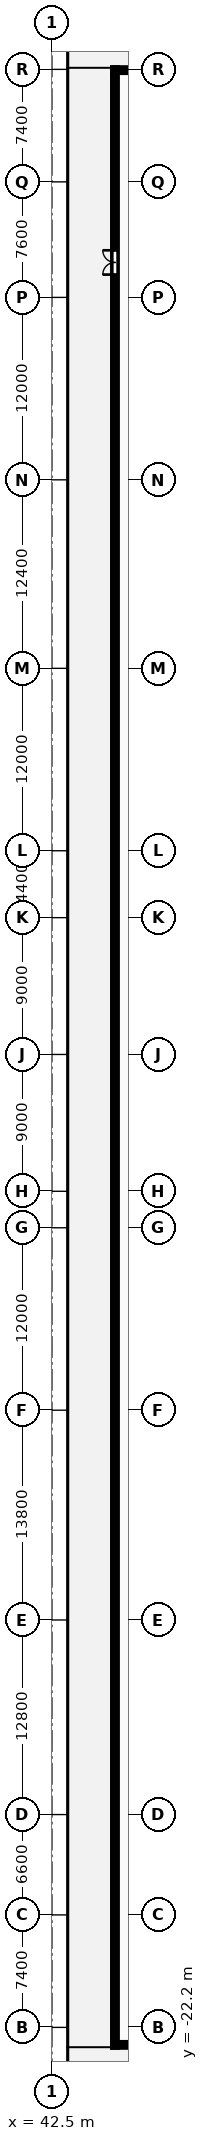
"""IFC4 building model, lengths in metres.
Left out: names, types, materials, properties, quantities, classifications, styles, units other than length and angle.
Written with IfcOpenShell. Run it as: python <this file> out.ifc"""

import sys

from ifc_helpers import new_model, si_unit, direction, frame, frame_2d, origin, place, context, subcontext, project, spatial, rectangle, extrude, element, fill, save


model = new_model("IFC4")
c1 = context("Model", 3, precision=1e-05, world=origin(), true_north=direction((0.0, 1.0)))
c2 = subcontext(c1, "Body", "Model", "MODEL_VIEW")
j1 = project(units=[si_unit("LENGTHUNIT", "METRE"), si_unit("PLANEANGLEUNIT", "RADIAN")], contexts=[c1])
p1 = place(None, origin())
s1 = spatial("IfcSite", under=j1, at=p1, CompositionType="ELEMENT")
p2 = place(p1, origin())
s2 = spatial("IfcBuilding", under=s1, at=p2, CompositionType="ELEMENT")
p3 = place(p2, frame((0.0, 0.0, 5.4)))
s3 = spatial("IfcBuildingStorey", under=s2, at=p3, CompositionType="ELEMENT", Elevation=5.4)
p4 = place(p3, frame((46.5, -23.35, 0.0), z_axis=(0.0, 0.0, 1.0), x_axis=(1.0, 0.0, 0.0)))
e1 = element("IfcWall", 1, at=p4, inside=s3, PredefinedType="STANDARD", context=c2, shape_type="SweptSolid", body=[
    extrude(rectangle(XDim=41.5, YDim=0.3, at=frame_2d((20.75, 0.0))), origin(), (0.0, 0.0, 1.0), 4.3),
])
p5 = place(p4, frame((14.0, 0.0, 0.0)))
e2 = element("IfcOpeningElement", 2, at=p5, cuts=e1, PredefinedType="OPENING", context=c2, shape_type="SweptSolid", body=[
    extrude(rectangle(XDim=1.6, YDim=2.2, at=frame_2d((0.8, 1.1))), frame((0.0, 0.16, 0.0), z_axis=(0.0, -1.0, 0.0), x_axis=(1.0, 0.0, 0.0)), (0.0, 0.0, 1.0), 0.32),
])
p6 = place(p4, frame((24.0, 0.0, 0.9)))
e3 = element("IfcOpeningElement", 3, at=p6, cuts=e1, PredefinedType="OPENING", context=c2, shape_type="SweptSolid", body=[
    extrude(rectangle(XDim=3.0, YDim=2.6, at=frame_2d((1.5, 1.3))), frame((0.0, 0.16, 0.0), z_axis=(0.0, -1.0, 0.0), x_axis=(1.0, 0.0, 0.0)), (0.0, 0.0, 1.0), 0.32),
])
p7 = place(p3, frame((86.0, 106.55, 0.0), z_axis=(0.0, 0.0, 1.0), x_axis=(-1.0, 0.0, 0.0)))
e4 = element("IfcWall", 4, at=p7, inside=s3, PredefinedType="STANDARD", context=c2, shape_type="SweptSolid", body=[
    extrude(rectangle(XDim=39.5, YDim=0.3, at=frame_2d((19.75, 0.0))), origin(), (0.0, 0.0, 1.0), 4.3),
])
p8 = place(p3, frame((46.65, 106.7, 0.0), z_axis=(0.0, 0.0, 1.0), x_axis=(0.0, -1.0, 0.0)))
e5 = element("IfcWall", 5, at=p8, inside=s3, PredefinedType="STANDARD", context=c2, shape_type="SweptSolid", body=[
    extrude(rectangle(XDim=130.2, YDim=0.3, at=frame_2d((65.1, 0.0))), origin(), (0.0, 0.0, 1.0), 4.3),
])
p9 = place(p8, frame((12.0, 0.0, 0.0)))
e6 = element("IfcOpeningElement", 6, at=p9, cuts=e5, PredefinedType="OPENING", context=c2, shape_type="SweptSolid", body=[
    extrude(rectangle(XDim=1.6, YDim=2.2, at=frame_2d((0.8, 1.1))), frame((0.0, 0.16, 0.0), z_axis=(0.0, -1.0, 0.0), x_axis=(1.0, 0.0, 0.0)), (0.0, 0.0, 1.0), 0.32),
])
p10 = place(p9, frame((1.6, 0.0, 0.0), z_axis=(0.0, 0.0, 1.0), x_axis=(-1.0, 0.0, 0.0)))
e7 = element("IfcDoor", 7, at=p10, inside=s3, OperationType="DOUBLE_DOOR_SINGLE_SWING", PredefinedType="DOOR", context=c2, shape_type="SweptSolid", body=[
    extrude(rectangle(XDim=1.6, YDim=2.2, at=frame_2d((0.8, 1.1))), frame((0.0, 0.025, 0.0), z_axis=(0.0, -1.0, 0.0), x_axis=(1.0, 0.0, 0.0)), (0.0, 0.0, 1.0), 0.05),
])
fill(e6, e7)
save(model, sys.argv[1])
